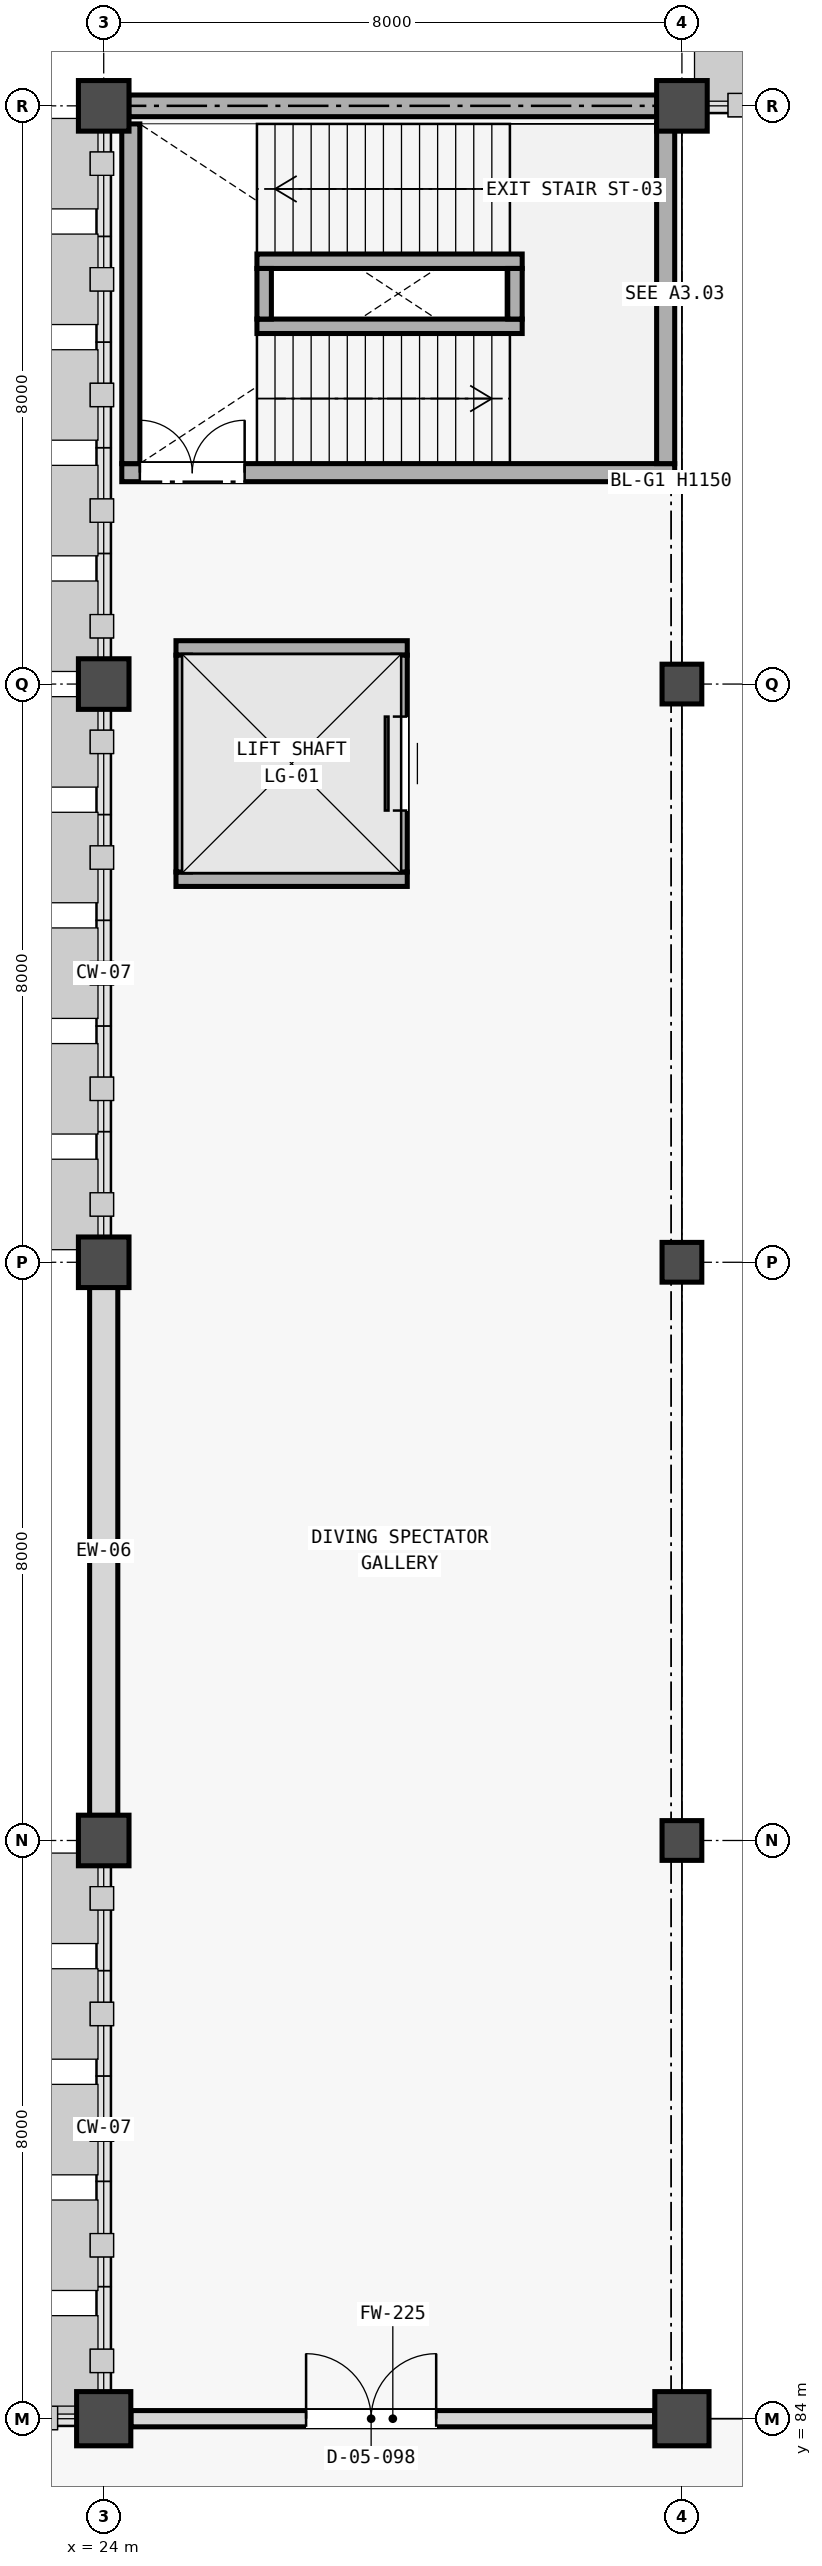
"""IFC4 building model, lengths in metres.
Left out: names, types, materials, properties, quantities, classifications, styles, units other than length and angle.
Written with IfcOpenShell. Run it as: python <this file> out.ifc"""

import sys

from ifc_helpers import new_model, si_unit, direction, frame, frame_2d, origin, origin_2d, place, context, subcontext, project, spatial, rectangle, extrude, element, fill, save


model = new_model("IFC4")
c1 = context("Model", 3, precision=1e-05, world=origin(), true_north=direction((0.0, 1.0)))
c2 = subcontext(c1, "Body", "Model", "MODEL_VIEW")
j1 = project(units=[si_unit("LENGTHUNIT", "METRE"), si_unit("PLANEANGLEUNIT", "RADIAN")], contexts=[c1])
p1 = place(None, origin())
s1 = spatial("IfcSite", under=j1, at=p1, CompositionType="ELEMENT")
p2 = place(p1, origin())
s2 = spatial("IfcBuilding", under=s1, at=p2, CompositionType="ELEMENT")
p3 = place(p2, frame((0.0, 0.0, 5.4)))
s3 = spatial("IfcBuildingStorey", under=s2, at=p3, CompositionType="ELEMENT", Elevation=5.4)
for number, where, z_axis, x_axis in (
    (1, (24.0, 84.0, 0.0), (0.0, 0.0, 1.0), (1.0, 0.0, 0.0)),
    (2, (32.0, 84.0, 0.0), (0.0, 0.0, 1.0), (1.0, 0.0, 0.0)),
):
    element("IfcColumn", number, at=place(p3, frame(where, z_axis=z_axis, x_axis=x_axis)), inside=s3, PredefinedType="COLUMN", context=c2, shape_type="SweptSolid", body=[
        extrude(rectangle(XDim=0.75, YDim=0.75, at=origin_2d()), origin(), (0.0, 0.0, 1.0), 4.55),
    ])
for number, where, z_axis, x_axis in (
    (3, (24.0, 116.0, 0.0), (0.0, 0.0, 1.0), (1.0, 0.0, 0.0)),
    (4, (32.0, 116.0, 0.0), (0.0, 0.0, 1.0), (1.0, 0.0, 0.0)),
    (5, (24.0, 92.0, 0.0), (0.0, 0.0, 1.0), (1.0, 0.0, 0.0)),
):
    element("IfcColumn", number, at=place(p3, frame(where, z_axis=z_axis, x_axis=x_axis)), inside=s3, PredefinedType="COLUMN", context=c2, shape_type="SweptSolid", body=[
        extrude(rectangle(XDim=0.7, YDim=0.7, at=origin_2d()), origin(), (0.0, 0.0, 1.0), 4.55),
    ])
p4 = place(p3, frame((32.0, 92.0, 0.0), z_axis=(0.0, 0.0, 1.0), x_axis=(1.0, 0.0, 0.0)))
e6 = element("IfcColumn", 6, at=p4, inside=s3, PredefinedType="COLUMN", context=c2, shape_type="SweptSolid", body=[
    extrude(rectangle(XDim=0.55, YDim=0.55, at=origin_2d()), origin(), (0.0, 0.0, 1.0), 4.55),
])
p5 = place(p3, frame((24.0, 100.0, 0.0), z_axis=(0.0, 0.0, 1.0), x_axis=(1.0, 0.0, 0.0)))
e7 = element("IfcColumn", 7, at=p5, inside=s3, PredefinedType="COLUMN", context=c2, shape_type="SweptSolid", body=[
    extrude(rectangle(XDim=0.7, YDim=0.7, at=origin_2d()), origin(), (0.0, 0.0, 1.0), 4.55),
])
p6 = place(p3, frame((32.0, 100.0, 0.0), z_axis=(0.0, 0.0, 1.0), x_axis=(1.0, 0.0, 0.0)))
e8 = element("IfcColumn", 8, at=p6, inside=s3, PredefinedType="COLUMN", context=c2, shape_type="SweptSolid", body=[
    extrude(rectangle(XDim=0.55, YDim=0.55, at=origin_2d()), origin(), (0.0, 0.0, 1.0), 4.55),
])
p7 = place(p3, frame((24.0, 108.0, 0.0), z_axis=(0.0, 0.0, 1.0), x_axis=(1.0, 0.0, 0.0)))
e9 = element("IfcColumn", 9, at=p7, inside=s3, PredefinedType="COLUMN", context=c2, shape_type="SweptSolid", body=[
    extrude(rectangle(XDim=0.7, YDim=0.7, at=origin_2d()), origin(), (0.0, 0.0, 1.0), 4.55),
])
p8 = place(p3, frame((32.0, 108.0, 0.0), z_axis=(0.0, 0.0, 1.0), x_axis=(1.0, 0.0, 0.0)))
e10 = element("IfcColumn", 10, at=p8, inside=s3, PredefinedType="COLUMN", context=c2, shape_type="SweptSolid", body=[
    extrude(rectangle(XDim=0.55, YDim=0.55, at=origin_2d()), origin(), (0.0, 0.0, 1.0), 4.55),
])
p9 = place(p3, frame((24.346, 116.0, 0.0), z_axis=(0.0, 0.0, 1.0), x_axis=(1.0, 0.0, 0.0)))
e11 = element("IfcWall", 11, at=p9, inside=s3, PredefinedType="SHEAR", context=c2, shape_type="SweptSolid", body=[
    extrude(rectangle(XDim=7.308, YDim=0.3, at=frame_2d((3.654, 0.0))), origin(), (0.0, 0.0, 1.0), 4.8),
])
p10 = place(p3, frame((24.0, 92.346, 0.0), z_axis=(0.0, 0.0, 1.0), x_axis=(0.0, 1.0, 0.0)))
e12 = element("IfcWall", 12, at=p10, inside=s3, PredefinedType="STANDARD", context=c2, shape_type="SweptSolid", body=[
    extrude(rectangle(XDim=7.308, YDim=0.39, at=frame_2d((3.654, 0.0))), origin(), (0.0, 0.0, 1.0), 3.98),
])
p11 = place(p3, frame((24.25, 110.925, 0.0), z_axis=(0.0, 0.0, 1.0), x_axis=(1.0, 0.0, 0.0)))
e13 = element("IfcWall", 13, at=p11, inside=s3, PredefinedType="SHEAR", context=c2, shape_type="SweptSolid", body=[
    extrude(rectangle(XDim=7.65, YDim=0.25, at=frame_2d((3.825, 0.0))), origin(), (0.0, 0.0, 1.0), 4.8),
])
p12 = place(p11, frame((0.25, 0.0, 0.0)))
e14 = element("IfcOpeningElement", 14, at=p12, cuts=e13, PredefinedType="OPENING", context=c2, shape_type="SweptSolid", body=[
    extrude(rectangle(XDim=1.45, YDim=2.2, at=frame_2d((0.725, 1.1))), frame((0.0, 0.135, 0.0), z_axis=(0.0, -1.0, 0.0), x_axis=(1.0, 0.0, 0.0)), (0.0, 0.0, 1.0), 0.27),
])
for number, where, z_axis, x_axis in (
    (15, (24.375, 111.05, 0.0), (0.0, 0.0, 1.0), (0.0, 1.0, 0.0)),
    (16, (31.775, 111.05, 0.0), (0.0, 0.0, 1.0), (0.0, 1.0, 0.0)),
):
    element("IfcWall", number, at=place(p3, frame(where, z_axis=z_axis, x_axis=x_axis)), inside=s3, PredefinedType="SHEAR", context=c2, shape_type="SweptSolid", body=[
        extrude(rectangle(XDim=4.7, YDim=0.25, at=frame_2d((2.35, 0.0))), origin(), (0.0, 0.0, 1.0), 4.8),
    ])
for number, where, z_axis, x_axis in (
    (17, (26.12, 112.95, 0.0), (0.0, 0.0, 1.0), (1.0, 0.0, 0.0)),
    (18, (26.12, 113.85, 0.0), (0.0, 0.0, 1.0), (1.0, 0.0, 0.0)),
):
    element("IfcWall", number, at=place(p3, frame(where, z_axis=z_axis, x_axis=x_axis)), inside=s3, PredefinedType="SHEAR", context=c2, shape_type="SweptSolid", body=[
        extrude(rectangle(XDim=3.67, YDim=0.2, at=frame_2d((1.835, 0.0))), origin(), (0.0, 0.0, 1.0), 4.8),
    ])
for number, where, z_axis, x_axis in (
    (19, (26.22, 113.05, 0.0), (0.0, 0.0, 1.0), (0.0, 1.0, 0.0)),
    (20, (29.69, 113.05, 0.0), (0.0, 0.0, 1.0), (0.0, 1.0, 0.0)),
):
    element("IfcWall", number, at=place(p3, frame(where, z_axis=z_axis, x_axis=x_axis)), inside=s3, PredefinedType="SHEAR", context=c2, shape_type="SweptSolid", body=[
        extrude(rectangle(XDim=0.7, YDim=0.2, at=frame_2d((0.35, 0.0))), origin(), (0.0, 0.0, 1.0), 4.8),
    ])
for number, where, z_axis, x_axis in (
    (21, (25.0, 105.3, 0.0), (0.0, 0.0, 1.0), (1.0, 0.0, 0.0)),
    (22, (25.0, 108.5, 0.0), (0.0, 0.0, 1.0), (1.0, 0.0, 0.0)),
):
    element("IfcWall", number, at=place(p3, frame(where, z_axis=z_axis, x_axis=x_axis)), inside=s3, PredefinedType="SHEAR", context=c2, shape_type="SweptSolid", body=[
        extrude(rectangle(XDim=3.2, YDim=0.2, at=frame_2d((1.6, 0.0))), origin(), (0.0, 0.0, 1.0), 4.8),
    ])
p13 = place(p3, frame((25.1, 105.4, 0.0), z_axis=(0.0, 0.0, 1.0), x_axis=(0.0, 1.0, 0.0)))
e23 = element("IfcWall", 23, at=p13, inside=s3, PredefinedType="SHEAR", context=c2, shape_type="SweptSolid", body=[
    extrude(rectangle(XDim=3.0, YDim=0.2, at=frame_2d((1.5, 0.0))), origin(), (0.0, 0.0, 1.0), 4.8),
])
p14 = place(p3, frame((28.1, 105.4, 0.0), z_axis=(0.0, 0.0, 1.0), x_axis=(0.0, 1.0, 0.0)))
e24 = element("IfcWall", 24, at=p14, inside=s3, PredefinedType="SHEAR", context=c2, shape_type="SweptSolid", body=[
    extrude(rectangle(XDim=3.0, YDim=0.2, at=frame_2d((1.5, 0.0))), origin(), (0.0, 0.0, 1.0), 4.8),
])
p15 = place(p14, frame((0.85, 0.0, 0.0)))
e25 = element("IfcOpeningElement", 25, at=p15, cuts=e24, PredefinedType="OPENING", context=c2, shape_type="SweptSolid", body=[
    extrude(rectangle(XDim=1.3, YDim=2.3, at=frame_2d((0.65, 1.15))), frame((0.0, 0.11, 0.0), z_axis=(0.0, -1.0, 0.0), x_axis=(1.0, 0.0, 0.0)), (0.0, 0.0, 1.0), 0.22),
])
p16 = place(p3, frame((24.377, 84.0, 0.0), z_axis=(0.0, 0.0, 1.0), x_axis=(1.0, 0.0, 0.0)))
e26 = element("IfcWall", 26, at=p16, inside=s3, PredefinedType="STANDARD", context=c2, shape_type="SweptSolid", body=[
    extrude(rectangle(XDim=7.246, YDim=0.225, at=frame_2d((3.623, 0.0))), origin(), (0.0, 0.0, 1.0), 3.73),
])
p17 = place(p16, frame((2.423, 0.0, 0.0)))
e27 = element("IfcOpeningElement", 27, at=p17, cuts=e26, PredefinedType="OPENING", context=c2, shape_type="SweptSolid", body=[
    extrude(rectangle(XDim=1.8, YDim=2.3, at=frame_2d((0.9, 1.15))), frame((0.0, 0.123, 0.0), z_axis=(0.0, -1.0, 0.0), x_axis=(1.0, 0.0, 0.0)), (0.0, 0.0, 1.0), 0.245),
])
p18 = place(p12, origin())
e28 = element("IfcDoor", 28, at=p18, inside=s3, OperationType="DOUBLE_DOOR_SINGLE_SWING", PredefinedType="DOOR", context=c2, shape_type="SweptSolid", body=[
    extrude(rectangle(XDim=1.45, YDim=2.2, at=frame_2d((0.725, 1.1))), frame((0.0, 0.025, 0.0), z_axis=(0.0, -1.0, 0.0), x_axis=(1.0, 0.0, 0.0)), (0.0, 0.0, 1.0), 0.05),
])
fill(e14, e28)
p19 = place(p15, origin())
e29 = element("IfcDoor", 29, at=p19, inside=s3, OperationType="SLIDING_TO_RIGHT", PredefinedType="DOOR", context=c2, shape_type="SweptSolid", body=[
    extrude(rectangle(XDim=1.3, YDim=2.3, at=frame_2d((0.65, 1.15))), frame((0.0, 0.025, 0.0), z_axis=(0.0, -1.0, 0.0), x_axis=(1.0, 0.0, 0.0)), (0.0, 0.0, 1.0), 0.05),
])
fill(e25, e29)
p20 = place(p17, origin())
e30 = element("IfcDoor", 30, at=p20, inside=s3, OperationType="DOUBLE_DOOR_SINGLE_SWING", PredefinedType="DOOR", context=c2, shape_type="SweptSolid", body=[
    extrude(rectangle(XDim=1.8, YDim=2.3, at=frame_2d((0.9, 1.15))), frame((0.0, 0.025, 0.0), z_axis=(0.0, -1.0, 0.0), x_axis=(1.0, 0.0, 0.0)), (0.0, 0.0, 1.0), 0.05),
])
fill(e27, e30)
save(model, sys.argv[1])
